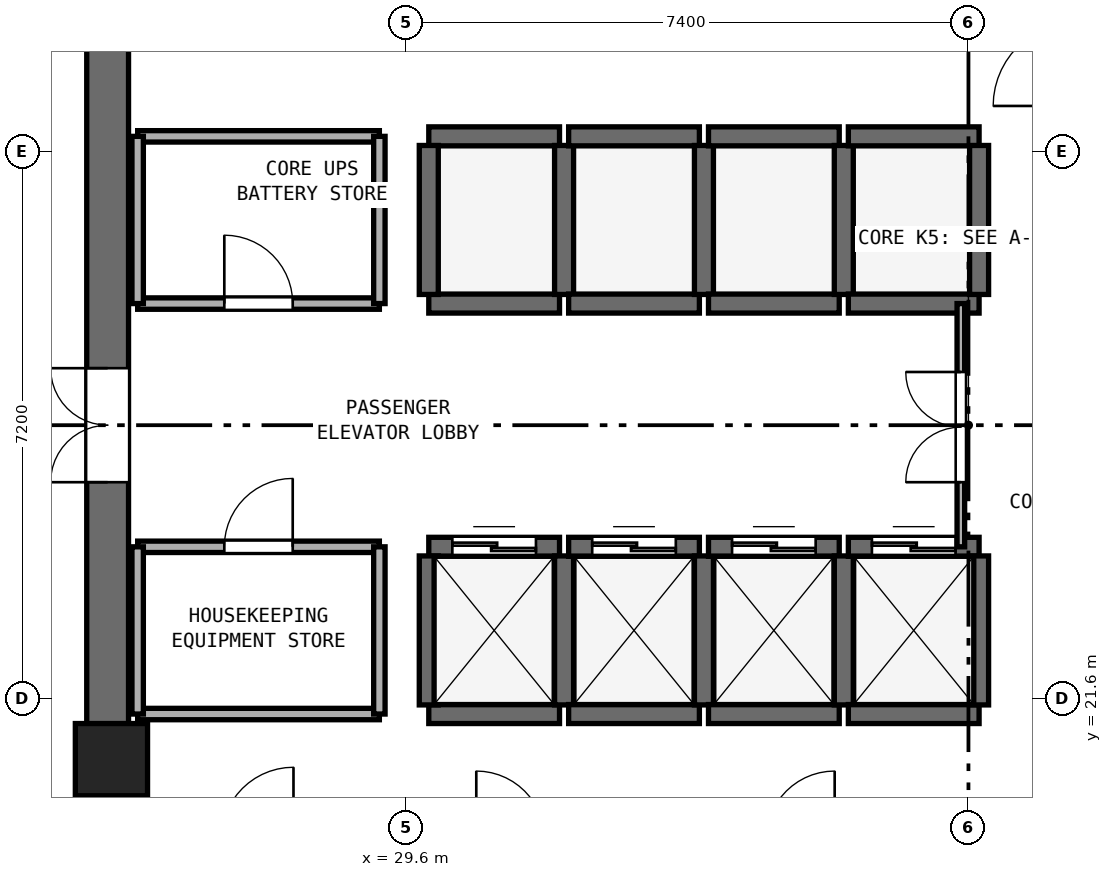
"""IFC4 building model, lengths in metres.
Left out: names, types, materials, properties, quantities, classifications, styles, units other than length and angle.
Written with IfcOpenShell. Run it as: python <this file> out.ifc"""

import sys

from ifc_helpers import new_model, si_unit, direction, frame, frame_2d, origin, origin_2d, place, context, subcontext, project, spatial, rectangle, extrude, element, fill, save


model = new_model("IFC4")
c1 = context("Model", 3, precision=1e-05, world=origin(), true_north=direction((0.0, 1.0)))
c2 = subcontext(c1, "Body", "Model", "MODEL_VIEW")
j1 = project(units=[si_unit("LENGTHUNIT", "METRE"), si_unit("PLANEANGLEUNIT", "RADIAN")], contexts=[c1])
p1 = place(None, origin())
s1 = spatial("IfcSite", under=j1, at=p1, CompositionType="ELEMENT")
p2 = place(p1, origin())
s2 = spatial("IfcBuilding", under=s1, at=p2, CompositionType="ELEMENT")
p3 = place(p2, frame((0.0, 0.0, 178.2)))
s3 = spatial("IfcBuildingStorey", under=s2, at=p3, CompositionType="ELEMENT", Elevation=178.2)
p4 = place(p3, frame((25.675, 17.55, 0.0), z_axis=(0.0, 0.0, 1.0), x_axis=(0.0, 1.0, 0.0)))
e1 = element("IfcWall", 1, at=p4, inside=s3, PredefinedType="SHEAR", context=c2, shape_type="SweptSolid", body=[
    extrude(rectangle(XDim=15.3, YDim=0.55, at=frame_2d((7.65, 0.0))), origin(), (0.0, 0.0, 1.0), 3.54),
])
p5 = place(p4, frame((6.9, 0.0, 0.0)))
e2 = element("IfcOpeningElement", 2, at=p5, cuts=e1, PredefinedType="OPENING", context=c2, shape_type="SweptSolid", body=[
    extrude(rectangle(XDim=1.5, YDim=2.15, at=frame_2d((0.75, 1.075))), frame((0.0, 0.285, 0.0), z_axis=(0.0, -1.0, 0.0), x_axis=(1.0, 0.0, 0.0)), (0.0, 0.0, 1.0), 0.57),
])
p6 = place(p3, frame((25.725, 20.8, 0.0), z_axis=(0.0, 0.0, 1.0), x_axis=(1.0, 0.0, 0.0)))
e3 = element("IfcColumn", 3, at=p6, inside=s3, PredefinedType="PILASTER", context=c2, shape_type="SweptSolid", body=[
    extrude(rectangle(XDim=0.95, YDim=0.95, at=origin_2d()), origin(), (0.0, 0.0, 1.0), 3.8),
])
p7 = place(p3, frame((29.9, 21.4, 0.0), z_axis=(0.0, 0.0, 1.0), x_axis=(1.0, 0.0, 0.0)))
e4 = element("IfcWall", 4, at=p7, inside=s3, PredefinedType="SHEAR", context=c2, shape_type="SweptSolid", body=[
    extrude(rectangle(XDim=1.72, YDim=0.25, at=frame_2d((0.86, 0.0))), origin(), (0.0, 0.0, 1.0), 3.54),
])
p8 = place(p3, frame((29.9, 23.6, 0.0), z_axis=(0.0, 0.0, 1.0), x_axis=(1.0, 0.0, 0.0)))
e5 = element("IfcWall", 5, at=p8, inside=s3, PredefinedType="SHEAR", context=c2, shape_type="SweptSolid", body=[
    extrude(rectangle(XDim=1.72, YDim=0.25, at=frame_2d((0.86, 0.0))), origin(), (0.0, 0.0, 1.0), 3.54),
])
p9 = place(p8, frame((0.31, 0.0, 0.0)))
e6 = element("IfcOpeningElement", 6, at=p9, cuts=e5, PredefinedType="OPENING", context=c2, shape_type="SweptSolid", body=[
    extrude(rectangle(XDim=1.1, YDim=2.15, at=frame_2d((0.55, 1.075))), frame((0.0, 0.135, 0.0), z_axis=(0.0, -1.0, 0.0), x_axis=(1.0, 0.0, 0.0)), (0.0, 0.0, 1.0), 0.27),
])
for number, where, z_axis, x_axis in (
    (7, (29.9, 21.52, 0.0), (0.0, 0.0, 1.0), (0.0, 1.0, 0.0)),
    (8, (31.68, 21.52, 0.0), (0.0, 0.0, 1.0), (0.0, 1.0, 0.0)),
):
    element("IfcWall", number, at=place(p3, frame(where, z_axis=z_axis, x_axis=x_axis)), inside=s3, PredefinedType="SHEAR", context=c2, shape_type="SweptSolid", body=[
        extrude(rectangle(XDim=1.96, YDim=0.25, at=frame_2d((0.98, 0.0))), origin(), (0.0, 0.0, 1.0), 3.54),
    ])
p10 = place(p3, frame((31.74, 21.4, 0.0), z_axis=(0.0, 0.0, 1.0), x_axis=(1.0, 0.0, 0.0)))
e9 = element("IfcWall", 9, at=p10, inside=s3, PredefinedType="SHEAR", context=c2, shape_type="SweptSolid", body=[
    extrude(rectangle(XDim=1.72, YDim=0.25, at=frame_2d((0.86, 0.0))), origin(), (0.0, 0.0, 1.0), 3.54),
])
p11 = place(p3, frame((31.74, 23.6, 0.0), z_axis=(0.0, 0.0, 1.0), x_axis=(1.0, 0.0, 0.0)))
e10 = element("IfcWall", 10, at=p11, inside=s3, PredefinedType="SHEAR", context=c2, shape_type="SweptSolid", body=[
    extrude(rectangle(XDim=1.72, YDim=0.25, at=frame_2d((0.86, 0.0))), origin(), (0.0, 0.0, 1.0), 3.54),
])
p12 = place(p11, frame((0.31, 0.0, 0.0)))
e11 = element("IfcOpeningElement", 11, at=p12, cuts=e10, PredefinedType="OPENING", context=c2, shape_type="SweptSolid", body=[
    extrude(rectangle(XDim=1.1, YDim=2.15, at=frame_2d((0.55, 1.075))), frame((0.0, 0.135, 0.0), z_axis=(0.0, -1.0, 0.0), x_axis=(1.0, 0.0, 0.0)), (0.0, 0.0, 1.0), 0.27),
])
p13 = place(p3, frame((33.52, 21.52, 0.0), z_axis=(0.0, 0.0, 1.0), x_axis=(0.0, 1.0, 0.0)))
e12 = element("IfcWall", 12, at=p13, inside=s3, PredefinedType="SHEAR", context=c2, shape_type="SweptSolid", body=[
    extrude(rectangle(XDim=1.96, YDim=0.25, at=frame_2d((0.98, 0.0))), origin(), (0.0, 0.0, 1.0), 3.54),
])
p14 = place(p3, frame((33.58, 21.4, 0.0), z_axis=(0.0, 0.0, 1.0), x_axis=(1.0, 0.0, 0.0)))
e13 = element("IfcWall", 13, at=p14, inside=s3, PredefinedType="SHEAR", context=c2, shape_type="SweptSolid", body=[
    extrude(rectangle(XDim=1.72, YDim=0.25, at=frame_2d((0.86, 0.0))), origin(), (0.0, 0.0, 1.0), 3.54),
])
p15 = place(p3, frame((33.58, 23.6, 0.0), z_axis=(0.0, 0.0, 1.0), x_axis=(1.0, 0.0, 0.0)))
e14 = element("IfcWall", 14, at=p15, inside=s3, PredefinedType="SHEAR", context=c2, shape_type="SweptSolid", body=[
    extrude(rectangle(XDim=1.72, YDim=0.25, at=frame_2d((0.86, 0.0))), origin(), (0.0, 0.0, 1.0), 3.54),
])
p16 = place(p15, frame((0.31, 0.0, 0.0)))
e15 = element("IfcOpeningElement", 15, at=p16, cuts=e14, PredefinedType="OPENING", context=c2, shape_type="SweptSolid", body=[
    extrude(rectangle(XDim=1.1, YDim=2.15, at=frame_2d((0.55, 1.075))), frame((0.0, 0.135, 0.0), z_axis=(0.0, -1.0, 0.0), x_axis=(1.0, 0.0, 0.0)), (0.0, 0.0, 1.0), 0.27),
])
p17 = place(p3, frame((35.36, 21.52, 0.0), z_axis=(0.0, 0.0, 1.0), x_axis=(0.0, 1.0, 0.0)))
e16 = element("IfcWall", 16, at=p17, inside=s3, PredefinedType="SHEAR", context=c2, shape_type="SweptSolid", body=[
    extrude(rectangle(XDim=1.96, YDim=0.25, at=frame_2d((0.98, 0.0))), origin(), (0.0, 0.0, 1.0), 3.54),
])
p18 = place(p3, frame((35.42, 21.4, 0.0), z_axis=(0.0, 0.0, 1.0), x_axis=(1.0, 0.0, 0.0)))
e17 = element("IfcWall", 17, at=p18, inside=s3, PredefinedType="SHEAR", context=c2, shape_type="SweptSolid", body=[
    extrude(rectangle(XDim=1.72, YDim=0.25, at=frame_2d((0.86, 0.0))), origin(), (0.0, 0.0, 1.0), 3.54),
])
p19 = place(p3, frame((35.42, 23.6, 0.0), z_axis=(0.0, 0.0, 1.0), x_axis=(1.0, 0.0, 0.0)))
e18 = element("IfcWall", 18, at=p19, inside=s3, PredefinedType="SHEAR", context=c2, shape_type="SweptSolid", body=[
    extrude(rectangle(XDim=1.72, YDim=0.25, at=frame_2d((0.86, 0.0))), origin(), (0.0, 0.0, 1.0), 3.54),
])
p20 = place(p19, frame((0.31, 0.0, 0.0)))
e19 = element("IfcOpeningElement", 19, at=p20, cuts=e18, PredefinedType="OPENING", context=c2, shape_type="SweptSolid", body=[
    extrude(rectangle(XDim=1.1, YDim=2.15, at=frame_2d((0.55, 1.075))), frame((0.0, 0.135, 0.0), z_axis=(0.0, -1.0, 0.0), x_axis=(1.0, 0.0, 0.0)), (0.0, 0.0, 1.0), 0.27),
])
p21 = place(p3, frame((37.14, 21.52, 0.0), z_axis=(0.0, 0.0, 1.0), x_axis=(0.0, 1.0, 0.0)))
e20 = element("IfcWall", 20, at=p21, inside=s3, PredefinedType="SHEAR", context=c2, shape_type="SweptSolid", body=[
    extrude(rectangle(XDim=1.96, YDim=0.25, at=frame_2d((0.98, 0.0))), origin(), (0.0, 0.0, 1.0), 3.54),
])
for number, where, z_axis, x_axis in (
    (21, (29.9, 26.8, 0.0), (0.0, 0.0, 1.0), (1.0, 0.0, 0.0)),
    (22, (29.9, 29.0, 0.0), (0.0, 0.0, 1.0), (1.0, 0.0, 0.0)),
):
    element("IfcWall", number, at=place(p3, frame(where, z_axis=z_axis, x_axis=x_axis)), inside=s3, PredefinedType="SHEAR", context=c2, shape_type="SweptSolid", body=[
        extrude(rectangle(XDim=1.72, YDim=0.25, at=frame_2d((0.86, 0.0))), origin(), (0.0, 0.0, 1.0), 3.54),
    ])
for number, where, z_axis, x_axis in (
    (23, (29.9, 26.92, 0.0), (0.0, 0.0, 1.0), (0.0, 1.0, 0.0)),
    (24, (31.68, 26.92, 0.0), (0.0, 0.0, 1.0), (0.0, 1.0, 0.0)),
):
    element("IfcWall", number, at=place(p3, frame(where, z_axis=z_axis, x_axis=x_axis)), inside=s3, PredefinedType="SHEAR", context=c2, shape_type="SweptSolid", body=[
        extrude(rectangle(XDim=1.96, YDim=0.25, at=frame_2d((0.98, 0.0))), origin(), (0.0, 0.0, 1.0), 3.54),
    ])
for number, where, z_axis, x_axis in (
    (25, (31.74, 26.8, 0.0), (0.0, 0.0, 1.0), (1.0, 0.0, 0.0)),
    (26, (31.74, 29.0, 0.0), (0.0, 0.0, 1.0), (1.0, 0.0, 0.0)),
):
    element("IfcWall", number, at=place(p3, frame(where, z_axis=z_axis, x_axis=x_axis)), inside=s3, PredefinedType="SHEAR", context=c2, shape_type="SweptSolid", body=[
        extrude(rectangle(XDim=1.72, YDim=0.25, at=frame_2d((0.86, 0.0))), origin(), (0.0, 0.0, 1.0), 3.54),
    ])
p22 = place(p3, frame((33.52, 26.92, 0.0), z_axis=(0.0, 0.0, 1.0), x_axis=(0.0, 1.0, 0.0)))
e27 = element("IfcWall", 27, at=p22, inside=s3, PredefinedType="SHEAR", context=c2, shape_type="SweptSolid", body=[
    extrude(rectangle(XDim=1.96, YDim=0.25, at=frame_2d((0.98, 0.0))), origin(), (0.0, 0.0, 1.0), 3.54),
])
for number, where, z_axis, x_axis in (
    (28, (33.58, 26.8, 0.0), (0.0, 0.0, 1.0), (1.0, 0.0, 0.0)),
    (29, (33.58, 29.0, 0.0), (0.0, 0.0, 1.0), (1.0, 0.0, 0.0)),
):
    element("IfcWall", number, at=place(p3, frame(where, z_axis=z_axis, x_axis=x_axis)), inside=s3, PredefinedType="SHEAR", context=c2, shape_type="SweptSolid", body=[
        extrude(rectangle(XDim=1.72, YDim=0.25, at=frame_2d((0.86, 0.0))), origin(), (0.0, 0.0, 1.0), 3.54),
    ])
p23 = place(p3, frame((35.36, 26.92, 0.0), z_axis=(0.0, 0.0, 1.0), x_axis=(0.0, 1.0, 0.0)))
e30 = element("IfcWall", 30, at=p23, inside=s3, PredefinedType="SHEAR", context=c2, shape_type="SweptSolid", body=[
    extrude(rectangle(XDim=1.96, YDim=0.25, at=frame_2d((0.98, 0.0))), origin(), (0.0, 0.0, 1.0), 3.54),
])
for number, where, z_axis, x_axis in (
    (31, (35.42, 26.8, 0.0), (0.0, 0.0, 1.0), (1.0, 0.0, 0.0)),
    (32, (35.42, 29.0, 0.0), (0.0, 0.0, 1.0), (1.0, 0.0, 0.0)),
):
    element("IfcWall", number, at=place(p3, frame(where, z_axis=z_axis, x_axis=x_axis)), inside=s3, PredefinedType="SHEAR", context=c2, shape_type="SweptSolid", body=[
        extrude(rectangle(XDim=1.72, YDim=0.25, at=frame_2d((0.86, 0.0))), origin(), (0.0, 0.0, 1.0), 3.54),
    ])
p24 = place(p3, frame((37.14, 26.92, 0.0), z_axis=(0.0, 0.0, 1.0), x_axis=(0.0, 1.0, 0.0)))
e33 = element("IfcWall", 33, at=p24, inside=s3, PredefinedType="SHEAR", context=c2, shape_type="SweptSolid", body=[
    extrude(rectangle(XDim=1.96, YDim=0.25, at=frame_2d((0.98, 0.0))), origin(), (0.0, 0.0, 1.0), 3.54),
])
p25 = place(p3, frame((26.07, 26.8, 0.0), z_axis=(0.0, 0.0, 1.0), x_axis=(1.0, 0.0, 0.0)))
e34 = element("IfcWall", 34, at=p25, inside=s3, PredefinedType="PARTITIONING", context=c2, shape_type="SweptSolid", body=[
    extrude(rectangle(XDim=3.18, YDim=0.15, at=frame_2d((1.59, 0.0))), origin(), (0.0, 0.0, 1.0), 3.54),
])
p26 = place(p25, frame((1.14, 0.0, 0.0)))
e35 = element("IfcOpeningElement", 35, at=p26, cuts=e34, PredefinedType="OPENING", context=c2, shape_type="SweptSolid", body=[
    extrude(rectangle(XDim=0.9, YDim=2.1, at=frame_2d((0.45, 1.05))), frame((0.0, 0.085, 0.0), z_axis=(0.0, -1.0, 0.0), x_axis=(1.0, 0.0, 0.0)), (0.0, 0.0, 1.0), 0.17),
])
p27 = place(p3, frame((26.07, 29.0, 0.0), z_axis=(0.0, 0.0, 1.0), x_axis=(1.0, 0.0, 0.0)))
e36 = element("IfcWall", 36, at=p27, inside=s3, PredefinedType="PARTITIONING", context=c2, shape_type="SweptSolid", body=[
    extrude(rectangle(XDim=3.18, YDim=0.15, at=frame_2d((1.59, 0.0))), origin(), (0.0, 0.0, 1.0), 3.54),
])
p28 = place(p3, frame((26.07, 26.8, 0.0), z_axis=(0.0, 0.0, 1.0), x_axis=(0.0, 1.0, 0.0)))
e37 = element("IfcWall", 37, at=p28, inside=s3, PredefinedType="PARTITIONING", context=c2, shape_type="SweptSolid", body=[
    extrude(rectangle(XDim=2.2, YDim=0.15, at=frame_2d((1.1, 0.0))), origin(), (0.0, 0.0, 1.0), 2.64),
])
p29 = place(p3, frame((29.25, 26.8, 0.0), z_axis=(0.0, 0.0, 1.0), x_axis=(0.0, 1.0, 0.0)))
e38 = element("IfcWall", 38, at=p29, inside=s3, PredefinedType="PARTITIONING", context=c2, shape_type="SweptSolid", body=[
    extrude(rectangle(XDim=2.2, YDim=0.15, at=frame_2d((1.1, 0.0))), origin(), (0.0, 0.0, 1.0), 3.54),
])
p30 = place(p3, frame((26.07, 21.4, 0.0), z_axis=(0.0, 0.0, 1.0), x_axis=(1.0, 0.0, 0.0)))
e39 = element("IfcWall", 39, at=p30, inside=s3, PredefinedType="PARTITIONING", context=c2, shape_type="SweptSolid", body=[
    extrude(rectangle(XDim=3.18, YDim=0.15, at=frame_2d((1.59, 0.0))), origin(), (0.0, 0.0, 1.0), 3.54),
])
p31 = place(p3, frame((26.07, 23.6, 0.0), z_axis=(0.0, 0.0, 1.0), x_axis=(1.0, 0.0, 0.0)))
e40 = element("IfcWall", 40, at=p31, inside=s3, PredefinedType="PARTITIONING", context=c2, shape_type="SweptSolid", body=[
    extrude(rectangle(XDim=3.18, YDim=0.15, at=frame_2d((1.59, 0.0))), origin(), (0.0, 0.0, 1.0), 3.54),
])
p32 = place(p31, frame((1.14, 0.0, 0.0)))
e41 = element("IfcOpeningElement", 41, at=p32, cuts=e40, PredefinedType="OPENING", context=c2, shape_type="SweptSolid", body=[
    extrude(rectangle(XDim=0.9, YDim=2.1, at=frame_2d((0.45, 1.05))), frame((0.0, 0.085, 0.0), z_axis=(0.0, -1.0, 0.0), x_axis=(1.0, 0.0, 0.0)), (0.0, 0.0, 1.0), 0.17),
])
p33 = place(p3, frame((26.07, 21.4, 0.0), z_axis=(0.0, 0.0, 1.0), x_axis=(0.0, 1.0, 0.0)))
e42 = element("IfcWall", 42, at=p33, inside=s3, PredefinedType="PARTITIONING", context=c2, shape_type="SweptSolid", body=[
    extrude(rectangle(XDim=2.2, YDim=0.15, at=frame_2d((1.1, 0.0))), origin(), (0.0, 0.0, 1.0), 2.64),
])
p34 = place(p3, frame((29.25, 21.4, 0.0), z_axis=(0.0, 0.0, 1.0), x_axis=(0.0, 1.0, 0.0)))
e43 = element("IfcWall", 43, at=p34, inside=s3, PredefinedType="PARTITIONING", context=c2, shape_type="SweptSolid", body=[
    extrude(rectangle(XDim=2.2, YDim=0.15, at=frame_2d((1.1, 0.0))), origin(), (0.0, 0.0, 1.0), 3.54),
])
p35 = place(p3, frame((36.9, 23.6, 0.0), z_axis=(0.0, 0.0, 1.0), x_axis=(0.0, 1.0, 0.0)))
e44 = element("IfcWall", 44, at=p35, inside=s3, PredefinedType="PARTITIONING", context=c2, shape_type="SweptSolid", body=[
    extrude(rectangle(XDim=3.2, YDim=0.1, at=frame_2d((1.6, 0.0))), origin(), (0.0, 0.0, 1.0), 3.54),
])
p36 = place(p35, frame((0.85, 0.0, 0.0)))
e45 = element("IfcOpeningElement", 45, at=p36, cuts=e44, PredefinedType="OPENING", context=c2, shape_type="SweptSolid", body=[
    extrude(rectangle(XDim=1.45, YDim=2.12, at=frame_2d((0.725, 1.06))), frame((0.0, 0.06, 0.0), z_axis=(0.0, -1.0, 0.0), x_axis=(1.0, 0.0, 0.0)), (0.0, 0.0, 1.0), 0.12),
])
p37 = place(p9, origin())
e46 = element("IfcDoor", 46, at=p37, inside=s3, OperationType="DOUBLE_DOOR_SLIDING", PredefinedType="DOOR", context=c2, shape_type="SweptSolid", body=[
    extrude(rectangle(XDim=1.1, YDim=2.15, at=frame_2d((0.55, 1.075))), frame((0.0, 0.025, 0.0), z_axis=(0.0, -1.0, 0.0), x_axis=(1.0, 0.0, 0.0)), (0.0, 0.0, 1.0), 0.05),
])
fill(e6, e46)
p38 = place(p12, origin())
e47 = element("IfcDoor", 47, at=p38, inside=s3, OperationType="DOUBLE_DOOR_SLIDING", PredefinedType="DOOR", context=c2, shape_type="SweptSolid", body=[
    extrude(rectangle(XDim=1.1, YDim=2.15, at=frame_2d((0.55, 1.075))), frame((0.0, 0.025, 0.0), z_axis=(0.0, -1.0, 0.0), x_axis=(1.0, 0.0, 0.0)), (0.0, 0.0, 1.0), 0.05),
])
fill(e11, e47)
p39 = place(p16, origin())
e48 = element("IfcDoor", 48, at=p39, inside=s3, OperationType="DOUBLE_DOOR_SLIDING", PredefinedType="DOOR", context=c2, shape_type="SweptSolid", body=[
    extrude(rectangle(XDim=1.1, YDim=2.15, at=frame_2d((0.55, 1.075))), frame((0.0, 0.025, 0.0), z_axis=(0.0, -1.0, 0.0), x_axis=(1.0, 0.0, 0.0)), (0.0, 0.0, 1.0), 0.05),
])
fill(e15, e48)
p40 = place(p20, origin())
e49 = element("IfcDoor", 49, at=p40, inside=s3, OperationType="DOUBLE_DOOR_SLIDING", PredefinedType="DOOR", context=c2, shape_type="SweptSolid", body=[
    extrude(rectangle(XDim=1.1, YDim=2.15, at=frame_2d((0.55, 1.075))), frame((0.0, 0.025, 0.0), z_axis=(0.0, -1.0, 0.0), x_axis=(1.0, 0.0, 0.0)), (0.0, 0.0, 1.0), 0.05),
])
fill(e19, e49)
p41 = place(p5, origin())
e50 = element("IfcDoor", 50, at=p41, inside=s3, OperationType="DOUBLE_DOOR_SINGLE_SWING", PredefinedType="DOOR", context=c2, shape_type="SweptSolid", body=[
    extrude(rectangle(XDim=1.5, YDim=2.15, at=frame_2d((0.75, 1.075))), frame((0.0, 0.025, 0.0), z_axis=(0.0, -1.0, 0.0), x_axis=(1.0, 0.0, 0.0)), (0.0, 0.0, 1.0), 0.05),
])
fill(e2, e50)
p42 = place(p26, origin())
e51 = element("IfcDoor", 51, at=p42, inside=s3, OperationType="SINGLE_SWING_LEFT", PredefinedType="DOOR", context=c2, shape_type="SweptSolid", body=[
    extrude(rectangle(XDim=0.9, YDim=2.1, at=frame_2d((0.45, 1.05))), frame((0.0, 0.025, 0.0), z_axis=(0.0, -1.0, 0.0), x_axis=(1.0, 0.0, 0.0)), (0.0, 0.0, 1.0), 0.05),
])
fill(e35, e51)
p43 = place(p32, origin())
e52 = element("IfcDoor", 52, at=p43, inside=s3, OperationType="SINGLE_SWING_RIGHT", PredefinedType="DOOR", context=c2, shape_type="SweptSolid", body=[
    extrude(rectangle(XDim=0.9, YDim=2.1, at=frame_2d((0.45, 1.05))), frame((0.0, 0.025, 0.0), z_axis=(0.0, -1.0, 0.0), x_axis=(1.0, 0.0, 0.0)), (0.0, 0.0, 1.0), 0.05),
])
fill(e41, e52)
p44 = place(p36, origin())
e53 = element("IfcDoor", 53, at=p44, inside=s3, OperationType="DOUBLE_DOOR_SINGLE_SWING", PredefinedType="DOOR", context=c2, shape_type="SweptSolid", body=[
    extrude(rectangle(XDim=1.45, YDim=2.12, at=frame_2d((0.725, 1.06))), frame((0.0, 0.025, 0.0), z_axis=(0.0, -1.0, 0.0), x_axis=(1.0, 0.0, 0.0)), (0.0, 0.0, 1.0), 0.05),
])
fill(e45, e53)
save(model, sys.argv[1])
